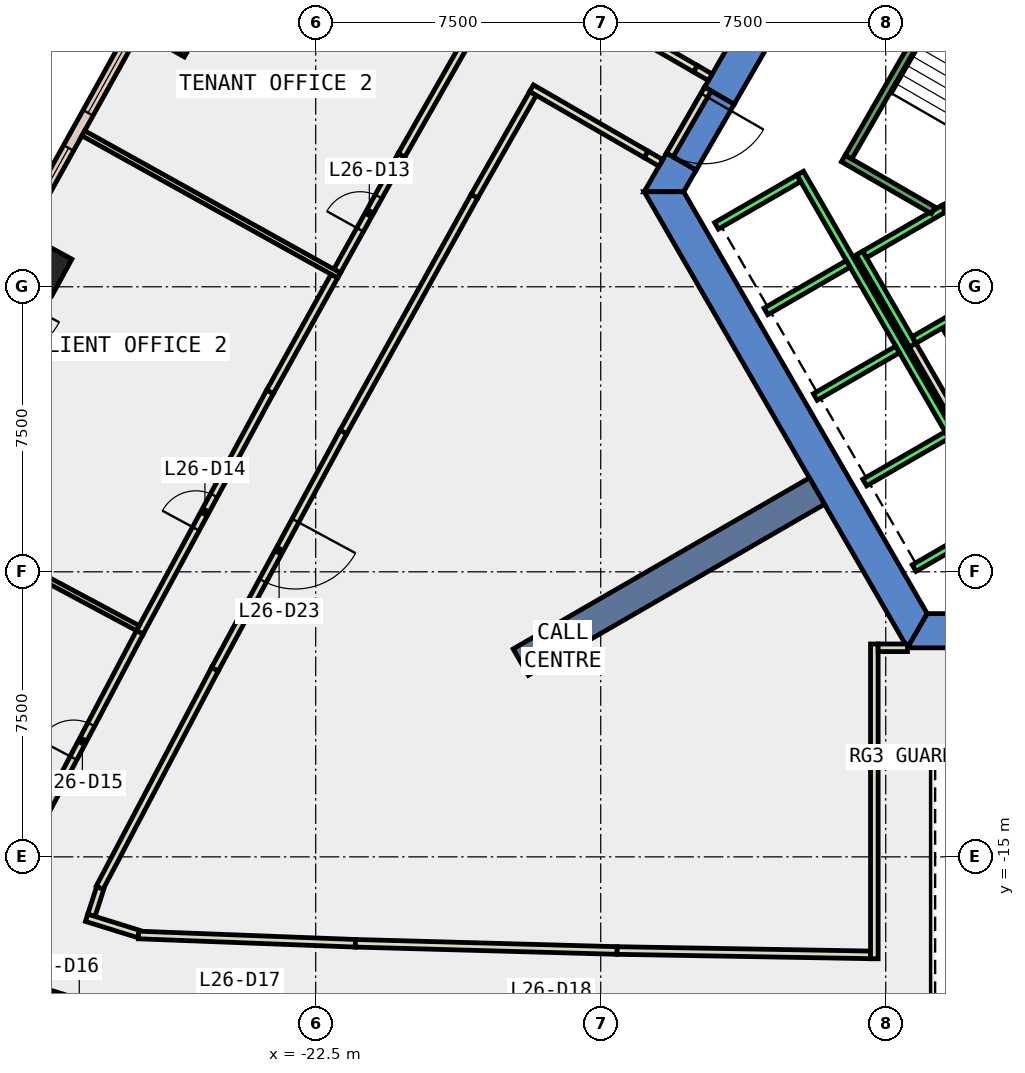
"""IFC4 building model, lengths in metres.
Left out: names, types, materials, properties, quantities, classifications, styles, units other than length and angle.
Written with IfcOpenShell. Run it as: python <this file> out.ifc"""

import sys

from ifc_helpers import new_model, si_unit, direction, frame, frame_2d, origin, origin_2d, place, context, subcontext, project, spatial, polyline, rectangle, outline, extrude, element, fill, save


model = new_model("IFC4")
c1 = context("Model", 3, precision=1e-05, world=origin(), true_north=direction((0.0, 1.0)))
c2 = subcontext(c1, "Body", "Model", "MODEL_VIEW")
j1 = project(units=[si_unit("LENGTHUNIT", "METRE"), si_unit("PLANEANGLEUNIT", "RADIAN")], contexts=[c1])
p1 = place(None, origin())
s1 = spatial("IfcSite", under=j1, at=p1, CompositionType="ELEMENT")
p2 = place(p1, origin())
s2 = spatial("IfcBuilding", under=s1, at=p2, CompositionType="ELEMENT")
p3 = place(p2, frame((0.0, 0.0, 120.2)))
s3 = spatial("IfcBuildingStorey", under=s2, at=p3, CompositionType="ELEMENT", Elevation=120.2)
for number, where, z_axis, x_axis in (
    (1, (-26.341, 6.896, -0.4), (0.0, 0.0, 1.0), (0.49, 0.872, 0.0)),
    (2, (-29.838, 0.604, -0.4), (0.0, 0.0, 1.0), (0.48, 0.877, 0.0)),
):
    element("IfcColumn", number, at=place(p3, frame(where, z_axis=z_axis, x_axis=x_axis)), inside=s3, PredefinedType="COLUMN", context=c2, shape_type="SweptSolid", body=[
        extrude(rectangle(XDim=1.1, YDim=1.5, at=origin_2d()), origin(), (0.0, 0.0, 1.0), 4.2),
    ])
p4 = place(p3, frame((0.0, 0.0, -0.4)))
e3 = element("IfcWall", 3, at=p4, inside=s3, PredefinedType="SHEAR", context=c2, shape_type="SweptSolid", body=[
    extrude(outline(polyline([(-12.267, 5.252), (-11.488, 4.802), (-6.409, 13.6), (-6.928, 14.5), (-12.267, 5.252)])), origin(), (0.0, 0.0, 1.0), 4.2),
])
p5 = place(p3, frame((0.0, 0.0, -0.4)))
e4 = element("IfcWall", 4, at=p5, inside=s3, PredefinedType="SHEAR", context=c2, shape_type="SweptSolid", body=[
    extrude(outline(polyline([(-12.488, 3.07), (-13.267, 3.52), (-13.856, 2.5), (-12.817, 2.5), (-12.488, 3.07)])), origin(), (0.0, 0.0, 1.0), 4.2),
])
p6 = place(p3, frame((0.0, 0.0, 3.6)))
e5 = element("IfcWall", 5, at=p6, inside=s3, PredefinedType="SHEAR", context=c2, shape_type="SweptSolid", body=[
    extrude(outline(polyline([(-13.267, 3.52), (-12.488, 3.07), (-11.488, 4.802), (-12.267, 5.252), (-13.267, 3.52)])), origin(), (0.0, 0.0, 1.0), 0.2),
])
p7 = place(p3, frame((0.0, 0.0, -0.4)))
e6 = element("IfcWall", 6, at=p7, inside=s3, PredefinedType="SHEAR", context=c2, shape_type="SweptSolid", body=[
    extrude(outline(polyline([(-13.856, 2.5), (-6.928, -9.5), (-6.409, -8.6), (-12.817, 2.5), (-13.856, 2.5)])), origin(), (0.0, 0.0, 1.0), 4.2),
])
p8 = place(p3, frame((0.0, 0.0, -0.4)))
e7 = element("IfcWall", 7, at=p8, inside=s3, PredefinedType="SHEAR", context=c2, shape_type="SweptSolid", body=[
    extrude(outline(polyline([(3.75, -9.5), (3.75, -8.6), (-6.409, -8.6), (-6.928, -9.5), (3.75, -9.5)])), origin(), (0.0, 0.0, 1.0), 4.2),
])
p9 = place(p3, frame((-9.31, -5.375, -0.4), z_axis=(0.0, 0.0, 1.0), x_axis=(-0.866017533419, -0.500013631625, 0.0)))
e8 = element("IfcWall", 8, at=p9, inside=s3, PredefinedType="SHEAR", context=c2, shape_type="SweptSolid", body=[
    extrude(rectangle(XDim=9.0, YDim=0.8, at=frame_2d((4.5, 0.0))), origin(), (0.0, 0.0, 1.0), 4.2),
])
p10 = place(p3, frame((-27.262, 6.784, 0.0), z_axis=(0.0, 0.0, 1.0), x_axis=(-0.485822751649, -0.874057351654, 0.0)))
e9 = element("IfcWall", 9, at=p10, inside=s3, PredefinedType="STANDARD", context=c2, shape_type="SweptSolid", body=[
    extrude(rectangle(XDim=6.109, YDim=0.3, at=frame_2d((3.055, 0.0))), origin(), (0.0, 0.0, 1.0), 3.8),
])
p11 = place(p10, frame((0.527, 0.0, 0.9)))
e10 = element("IfcOpeningElement", 10, at=p11, cuts=e9, PredefinedType="OPENING", context=c2, shape_type="SweptSolid", body=[
    extrude(rectangle(XDim=2.0, YDim=2.6, at=frame_2d((1.0, 1.3))), frame((0.0, 0.16, 0.0), z_axis=(0.0, -1.0, 0.0), x_axis=(1.0, 0.0, 0.0)), (0.0, 0.0, 1.0), 0.32),
])
p12 = place(p10, frame((3.582, 0.0, 0.9)))
e11 = element("IfcOpeningElement", 11, at=p12, cuts=e9, PredefinedType="OPENING", context=c2, shape_type="SweptSolid", body=[
    extrude(rectangle(XDim=2.0, YDim=2.6, at=frame_2d((1.0, 1.3))), frame((0.0, 0.16, 0.0), z_axis=(0.0, -1.0, 0.0), x_axis=(1.0, 0.0, 0.0)), (0.0, 0.0, 1.0), 0.32),
])
p13 = place(p3, frame((-15.532, 7.484, 0.0), z_axis=(0.0, 0.0, 1.0), x_axis=(0.866045954906, -0.499964402723, 0.0)))
e12 = element("IfcWall", 12, at=p13, inside=s3, PredefinedType="PARTITIONING", context=c2, shape_type="SweptSolid", body=[
    extrude(rectangle(XDim=3.494, YDim=0.2, at=frame_2d((1.747, 0.0))), origin(), (0.0, 0.0, 1.0), 3.8),
])
p14 = place(p3, frame((-13.417, 3.26, 0.0), z_axis=(0.0, 0.0, 1.0), x_axis=(-0.866032067792, 0.499988457423, 0.0)))
e13 = element("IfcWall", 13, at=p14, inside=s3, PredefinedType="PARTITIONING", context=c2, shape_type="SweptSolid", body=[
    extrude(rectangle(XDim=0.45, YDim=0.2, at=frame_2d((0.225, 0.0))), origin(), (0.0, 0.0, 1.0), 2.4),
])
p15 = place(p3, frame((-16.783, 5.088, 0.0), z_axis=(0.0, 0.0, 1.0), x_axis=(-0.495023676383, -0.868879485211, 0.0)))
e14 = element("IfcWall", 14, at=p15, inside=s3, PredefinedType="PARTITIONING", context=c2, shape_type="SweptSolid", body=[
    extrude(rectangle(XDim=3.113, YDim=0.2, at=frame_2d((1.557, 0.0))), origin(), (0.0, 0.0, 1.0), 3.8),
])
p16 = place(p3, frame((-18.324, 2.383, 0.0), z_axis=(0.0, 0.0, 1.0), x_axis=(-0.485826874234, -0.874055060206, 0.0)))
e15 = element("IfcWall", 15, at=p16, inside=s3, PredefinedType="PARTITIONING", context=c2, shape_type="SweptSolid", body=[
    extrude(rectangle(XDim=7.099, YDim=0.2, at=frame_2d((3.55, 0.0))), origin(), (0.0, 0.0, 1.0), 3.8),
])
p17 = place(p3, frame((-21.773, -3.822, 0.0), z_axis=(0.0, 0.0, 1.0), x_axis=(-0.476124717613, -0.87937776483, 0.0)))
e16 = element("IfcWall", 16, at=p17, inside=s3, PredefinedType="PARTITIONING", context=c2, shape_type="SweptSolid", body=[
    extrude(rectangle(XDim=7.099, YDim=0.2, at=frame_2d((3.55, 0.0))), origin(), (0.0, 0.0, 1.0), 3.8),
])
p18 = place(p17, frame((2.65, 0.0, 0.0)))
e17 = element("IfcOpeningElement", 17, at=p18, cuts=e16, PredefinedType="OPENING", context=c2, shape_type="SweptSolid", body=[
    extrude(rectangle(XDim=1.8, YDim=2.1, at=frame_2d((0.9, 1.05))), frame((0.0, 0.11, 0.0), z_axis=(0.0, -1.0, 0.0), x_axis=(1.0, 0.0, 0.0)), (0.0, 0.0, 1.0), 0.22),
])
p19 = place(p3, frame((-25.153, -10.065, 0.0), z_axis=(0.0, 0.0, 1.0), x_axis=(-0.466663976618, -0.884434696813, 0.0)))
e18 = element("IfcWall", 18, at=p19, inside=s3, PredefinedType="PARTITIONING", context=c2, shape_type="SweptSolid", body=[
    extrude(rectangle(XDim=6.501, YDim=0.2, at=frame_2d((3.25, 0.0))), origin(), (0.0, 0.0, 1.0), 3.8),
])
p20 = place(p3, frame((-28.171, -15.821, 0.0), z_axis=(0.0, 0.0, 1.0), x_axis=(-0.308053137273, -0.951369152651, 0.0)))
e19 = element("IfcWall", 19, at=p20, inside=s3, PredefinedType="PARTITIONING", context=c2, shape_type="SweptSolid", body=[
    extrude(rectangle(XDim=0.754, YDim=0.2, at=frame_2d((0.377, 0.0))), origin(), (0.0, 0.0, 1.0), 3.8),
])
p21 = place(p3, frame((-28.529, -16.603, 0.0), z_axis=(0.0, 0.0, 1.0), x_axis=(0.954829998701, -0.297152609916, 0.0)))
e20 = element("IfcWall", 20, at=p21, inside=s3, PredefinedType="PARTITIONING", context=c2, shape_type="SweptSolid", body=[
    extrude(rectangle(XDim=1.437, YDim=0.2, at=frame_2d((0.719, 0.0))), origin(), (0.0, 0.0, 1.0), 3.8),
])
p22 = place(p3, frame((-27.162, -17.056, 0.0), z_axis=(0.0, 0.0, 1.0), x_axis=(0.999270868304, -0.038180253525, 0.0)))
e21 = element("IfcWall", 21, at=p22, inside=s3, PredefinedType="PARTITIONING", context=c2, shape_type="SweptSolid", body=[
    extrude(rectangle(XDim=5.71, YDim=0.2, at=frame_2d((2.855, 0.0))), origin(), (0.0, 0.0, 1.0), 3.8),
])
p23 = place(p3, frame((-21.456, -17.274, 0.0), z_axis=(0.0, 0.0, 1.0), x_axis=(0.999618915549, -0.02760477632, 0.0)))
e22 = element("IfcWall", 22, at=p23, inside=s3, PredefinedType="PARTITIONING", context=c2, shape_type="SweptSolid", body=[
    extrude(rectangle(XDim=6.89, YDim=0.2, at=frame_2d((3.445, 0.0))), origin(), (0.0, 0.0, 1.0), 3.8),
])
p24 = place(p3, frame((-14.569, -17.464, 0.0), z_axis=(0.0, 0.0, 1.0), x_axis=(0.999851389672, -0.017239448129, 0.0)))
e23 = element("IfcWall", 23, at=p24, inside=s3, PredefinedType="PARTITIONING", context=c2, shape_type="SweptSolid", body=[
    extrude(rectangle(XDim=6.67, YDim=0.2, at=frame_2d((3.335, 0.0))), origin(), (0.0, 0.0, 1.0), 3.8),
])
p25 = place(p3, frame((-21.936, 0.414, 0.0), z_axis=(0.0, 0.0, 1.0), x_axis=(0.485827202541, 0.874054877723, 0.0)))
e24 = element("IfcWall", 24, at=p25, inside=s3, PredefinedType="PARTITIONING", context=c2, shape_type="SweptSolid", body=[
    extrude(rectangle(XDim=3.487, YDim=0.2, at=frame_2d((1.744, 0.0))), origin(), (0.0, 0.0, 1.0), 3.8),
])
p26 = place(p25, frame((1.244, 0.0, 0.0)))
e25 = element("IfcOpeningElement", 25, at=p26, cuts=e24, PredefinedType="OPENING", context=c2, shape_type="SweptSolid", body=[
    extrude(rectangle(XDim=1.0, YDim=2.1, at=frame_2d((0.5, 1.05))), frame((0.0, 0.11, 0.0), z_axis=(0.0, -1.0, 0.0), x_axis=(1.0, 0.0, 0.0)), (0.0, 0.0, 1.0), 0.22),
])
p27 = place(p3, frame((-20.242, 3.462, 0.0), z_axis=(0.0, 0.0, 1.0), x_axis=(0.495309264725, 0.868716715781, 0.0)))
e26 = element("IfcWall", 26, at=p27, inside=s3, PredefinedType="PARTITIONING", context=c2, shape_type="SweptSolid", body=[
    extrude(rectangle(XDim=3.487, YDim=0.2, at=frame_2d((1.743, 0.0))), origin(), (0.0, 0.0, 1.0), 3.8),
])
p28 = place(p3, frame((-27.129, -9.094, 0.0), z_axis=(0.0, 0.0, 1.0), x_axis=(0.476090835435, 0.879396108938, 0.0)))
e27 = element("IfcWall", 27, at=p28, inside=s3, PredefinedType="PARTITIONING", context=c2, shape_type="SweptSolid", body=[
    extrude(rectangle(XDim=7.198, YDim=0.2, at=frame_2d((3.599, 0.0))), origin(), (0.0, 0.0, 1.0), 3.8),
])
p29 = place(p28, frame((3.099, 0.0, 0.0)))
e28 = element("IfcOpeningElement", 28, at=p29, cuts=e27, PredefinedType="OPENING", context=c2, shape_type="SweptSolid", body=[
    extrude(rectangle(XDim=1.0, YDim=2.1, at=frame_2d((0.5, 1.05))), frame((0.0, 0.11, 0.0), z_axis=(0.0, -1.0, 0.0), x_axis=(1.0, 0.0, 0.0)), (0.0, 0.0, 1.0), 0.22),
])
p30 = place(p3, frame((-23.702, -2.764, 0.0), z_axis=(0.0, 0.0, 1.0), x_axis=(0.485892653581, 0.874018494767, 0.0)))
e29 = element("IfcWall", 29, at=p30, inside=s3, PredefinedType="PARTITIONING", context=c2, shape_type="SweptSolid", body=[
    extrude(rectangle(XDim=3.486, YDim=0.2, at=frame_2d((1.743, 0.0))), origin(), (0.0, 0.0, 1.0), 3.8),
])
p31 = place(p3, frame((-30.221, -14.956, 0.0), z_axis=(0.0, 0.0, 1.0), x_axis=(0.466543318111, 0.884498350663, 0.0)))
e30 = element("IfcWall", 30, at=p31, inside=s3, PredefinedType="PARTITIONING", context=c2, shape_type="SweptSolid", body=[
    extrude(rectangle(XDim=6.627, YDim=0.2, at=frame_2d((3.314, 0.0))), origin(), (0.0, 0.0, 1.0), 3.8),
])
p32 = place(p31, frame((2.889, 0.0, 0.0)))
e31 = element("IfcOpeningElement", 31, at=p32, cuts=e30, PredefinedType="OPENING", context=c2, shape_type="SweptSolid", body=[
    extrude(rectangle(XDim=1.0, YDim=2.1, at=frame_2d((0.5, 1.05))), frame((0.0, 0.11, 0.0), z_axis=(0.0, -1.0, 0.0), x_axis=(1.0, 0.0, 0.0)), (0.0, 0.0, 1.0), 0.22),
])
p33 = place(p3, frame((-27.533, -19.217, 0.0), z_axis=(0.0, 0.0, 1.0), x_axis=(-0.954946345159, 0.296778499671, 0.0)))
e32 = element("IfcWall", 32, at=p33, inside=s3, PredefinedType="PARTITIONING", context=c2, shape_type="SweptSolid", body=[
    extrude(rectangle(XDim=2.49, YDim=0.2, at=frame_2d((1.245, 0.0))), origin(), (0.0, 0.0, 1.0), 3.8),
])
p34 = place(p33, frame((0.745, 0.0, 0.0)))
e33 = element("IfcOpeningElement", 33, at=p34, cuts=e32, PredefinedType="OPENING", context=c2, shape_type="SweptSolid", body=[
    extrude(rectangle(XDim=1.0, YDim=2.1, at=frame_2d((0.5, 1.05))), frame((0.0, 0.11, 0.0), z_axis=(0.0, -1.0, 0.0), x_axis=(1.0, 0.0, 0.0)), (0.0, 0.0, 1.0), 0.22),
])
p35 = place(p3, frame((-5.126, -2.422, 0.0), z_axis=(0.0, 0.0, 1.0), x_axis=(-0.500062241894, 0.865989465428, 0.0)))
e34 = element("IfcWall", 34, at=p35, inside=s3, PredefinedType="PARTITIONING", context=c2, shape_type="SweptSolid", body=[
    extrude(rectangle(XDim=1.7, YDim=0.2, at=frame_2d((0.85, 0.0))), origin(), (0.0, 0.0, 1.0), 3.8),
])
p36 = place(p3, frame((-5.492, -3.788, 0.0), z_axis=(0.0, 0.0, 1.0), x_axis=(-0.500008949224, 0.866020236886, 0.0)))
e35 = element("IfcWall", 35, at=p36, inside=s3, PredefinedType="PARTITIONING", context=c2, shape_type="SweptSolid", body=[
    extrude(rectangle(XDim=2.68, YDim=0.2, at=frame_2d((1.34, 0.0))), origin(), (0.0, 0.0, 1.0), 3.8),
])
p37 = place(p3, frame((-7.8, -17.681, 0.0), z_axis=(0.0, 0.0, 1.0), x_axis=(0.0, 1.0, 0.0)))
e36 = element("IfcWall", 36, at=p37, inside=s3, PredefinedType="PARTITIONING", context=c2, shape_type="SweptSolid", body=[
    extrude(rectangle(XDim=8.282, YDim=0.2, at=frame_2d((4.141, 0.0))), origin(), (0.0, 0.0, 1.0), 3.8),
])
p38 = place(p3, frame((-7.7, -9.499, 0.0), z_axis=(0.0, 0.0, 1.0), x_axis=(1.0, 0.0, 0.0)))
e37 = element("IfcWall", 37, at=p38, inside=s3, PredefinedType="PARTITIONING", context=c2, shape_type="SweptSolid", body=[
    extrude(rectangle(XDim=0.771, YDim=0.2, at=frame_2d((0.385, 0.0))), origin(), (0.0, 0.0, 1.0), 3.8),
])
p39 = place(p3, frame((-21.885, 0.3, 0.0), z_axis=(0.0, 0.0, 1.0), x_axis=(-0.874095944746, 0.485753311237, 0.0)))
e38 = element("IfcWall", 38, at=p39, inside=s3, PredefinedType="PARTITIONING", context=c2, shape_type="SweptSolid", body=[
    extrude(rectangle(XDim=7.699, YDim=0.15, at=frame_2d((3.85, 0.0))), origin(), (0.0, 0.0, 1.0), 3.8),
])
p40 = place(p3, frame((-27.182, -8.981, 0.0), z_axis=(0.0, 0.0, 1.0), x_axis=(-0.881899408669, 0.471437623647, 0.0)))
e39 = element("IfcWall", 39, at=p40, inside=s3, PredefinedType="PARTITIONING", context=c2, shape_type="SweptSolid", body=[
    extrude(rectangle(XDim=6.13, YDim=0.15, at=frame_2d((3.065, 0.0))), origin(), (0.0, 0.0, 1.0), 3.8),
])
p41 = place(p3, frame((-12.18, 5.202, 0.0), z_axis=(0.0, 0.0, 1.0), x_axis=(-0.50002537861, -0.866010750942, 0.0)))
e40 = element("IfcWall", 40, at=p41, inside=s3, PredefinedType="PARTITIONING", context=c2, shape_type="SweptSolid", body=[
    extrude(rectangle(XDim=2.0, YDim=0.2, at=frame_2d((1.0, 0.0))), origin(), (0.0, 0.0, 1.0), 2.4),
])
p42 = place(p41, frame((0.19, 0.0, 0.0)))
e41 = element("IfcOpeningElement", 41, at=p42, cuts=e40, PredefinedType="OPENING", context=c2, shape_type="SweptSolid", body=[
    extrude(rectangle(XDim=1.8, YDim=2.1, at=frame_2d((0.9, 1.05))), frame((0.0, 0.11, 0.0), z_axis=(0.0, -1.0, 0.0), x_axis=(1.0, 0.0, 0.0)), (0.0, 0.0, 1.0), 0.22),
])
p43 = place(p3, frame((-12.506, 5.737, 0.0), z_axis=(0.0, 0.0, 1.0), x_axis=(0.865624510465, -0.500693725627, 0.0)))
e42 = element("IfcWall", 42, at=p43, inside=s3, PredefinedType="PARTITIONING", context=c2, shape_type="SweptSolid", body=[
    extrude(rectangle(XDim=0.449, YDim=0.2, at=frame_2d((0.225, 0.0))), origin(), (0.0, 0.0, 1.0), 2.4),
])
p44 = place(p3, frame((-13.807, 3.485, 0.0), z_axis=(0.0, 0.0, 1.0), x_axis=(-0.865984597717, 0.500070671522, 0.0)))
e43 = element("IfcWall", 43, at=p44, inside=s3, PredefinedType="PARTITIONING", context=c2, shape_type="SweptSolid", body=[
    extrude(rectangle(XDim=3.479, YDim=0.2, at=frame_2d((1.74, 0.0))), origin(), (0.0, 0.0, 1.0), 3.8),
])
p45 = place(p3, frame((-5.94, 2.188, 0.0), z_axis=(0.0, 0.0, 1.0), x_axis=(0.49994636267, -0.866056369097, 0.0)))
e44 = element("IfcWall", 44, at=p45, inside=s3, PredefinedType="STANDARD", context=c2, shape_type="SweptSolid", body=[
    extrude(rectangle(XDim=2.8, YDim=0.2, at=frame_2d((1.4, 0.0))), origin(), (0.0, 0.0, 1.0), 3.8),
])
p46 = place(p45, frame((1.225, 0.0, 0.0)))
e45 = element("IfcOpeningElement", 45, at=p46, cuts=e44, PredefinedType="OPENING", context=c2, shape_type="SweptSolid", body=[
    extrude(rectangle(XDim=1.1, YDim=2.1, at=frame_2d((0.55, 1.05))), frame((0.0, 0.11, 0.0), z_axis=(0.0, -1.0, 0.0), x_axis=(1.0, 0.0, 0.0)), (0.0, 0.0, 1.0), 0.22),
])
p47 = place(p3, frame((-8.192, 0.888, 0.0), z_axis=(0.0, 0.0, 1.0), x_axis=(0.49994636267, -0.866056369097, 0.0)))
e46 = element("IfcWall", 46, at=p47, inside=s3, PredefinedType="STANDARD", context=c2, shape_type="SweptSolid", body=[
    extrude(rectangle(XDim=2.8, YDim=0.2, at=frame_2d((1.4, 0.0))), origin(), (0.0, 0.0, 1.0), 3.8),
])
for number, where, z_axis, x_axis in (
    (47, (-5.977, 2.052, 0.0), (0.0, 0.0, 1.0), (-0.866, -0.5, 0.0)),
    (48, (-4.677, -0.2, 0.0), (0.0, 0.0, 1.0), (-0.866, -0.5, 0.0)),
):
    element("IfcWall", number, at=place(p3, frame(where, z_axis=z_axis, x_axis=x_axis)), inside=s3, PredefinedType="STANDARD", context=c2, shape_type="SweptSolid", body=[
        extrude(rectangle(XDim=2.399, YDim=0.2, at=frame_2d((1.2, 0.0))), origin(), (0.0, 0.0, 1.0), 3.8),
    ])
p48 = place(p3, frame((-9.751, 2.99, 0.0), z_axis=(0.0, 0.0, 1.0), x_axis=(0.50000090737, -0.866024879913, 0.0)))
e49 = element("IfcWall", 49, at=p48, inside=s3, PredefinedType="STANDARD", context=c2, shape_type="SweptSolid", body=[
    extrude(rectangle(XDim=10.6, YDim=0.2, at=frame_2d((5.3, 0.0))), origin(), (0.0, 0.0, 1.0), 3.8),
])
p49 = place(p3, frame((-9.788, 2.853, 0.0), z_axis=(0.0, 0.0, 1.0), x_axis=(-0.865998541277, -0.500046524342, 0.0)))
e50 = element("IfcWall", 50, at=p49, inside=s3, PredefinedType="STANDARD", context=c2, shape_type="SweptSolid", body=[
    extrude(rectangle(XDim=2.5, YDim=0.2, at=frame_2d((1.25, 0.0))), origin(), (0.0, 0.0, 1.0), 3.8),
])
for number, where, z_axis, x_axis in (
    (51, (-8.488, 0.602, 0.0), (0.0, 0.0, 1.0), (-0.866, -0.5, 0.0)),
    (52, (-7.188, -1.65, 0.0), (0.0, 0.0, 1.0), (-0.866, -0.5, 0.0)),
    (53, (-5.888, -3.902, 0.0), (0.0, 0.0, 1.0), (-0.866, -0.5, 0.0)),
    (54, (-4.588, -6.153, 0.0), (0.0, 0.0, 1.0), (-0.866, -0.5, 0.0)),
):
    element("IfcWall", number, at=place(p3, frame(where, z_axis=z_axis, x_axis=x_axis)), inside=s3, PredefinedType="STANDARD", context=c2, shape_type="SweptSolid", body=[
        extrude(rectangle(XDim=2.5, YDim=0.2, at=frame_2d((1.25, 0.0))), origin(), (0.0, 0.0, 1.0), 3.8),
    ])
p50 = place(p3, frame((-6.25, 2.01, 0.0), z_axis=(0.0, 0.0, 1.0), x_axis=(-0.86611865017, 0.499838457731, 0.0)))
e55 = element("IfcWall", 55, at=p50, inside=s3, PredefinedType="STANDARD", context=c2, shape_type="SweptSolid", body=[
    extrude(rectangle(XDim=2.733, YDim=0.2, at=frame_2d((1.366, 0.0))), origin(), (0.0, 0.0, 1.0), 3.8),
])
p51 = place(p3, frame((-5.03, 9.388, 0.0), z_axis=(0.0, 0.0, 1.0), x_axis=(-0.499978703459, -0.866037698999, 0.0)))
e56 = element("IfcWall", 56, at=p51, inside=s3, PredefinedType="STANDARD", context=c2, shape_type="SweptSolid", body=[
    extrude(rectangle(XDim=6.9, YDim=0.2, at=frame_2d((3.45, 0.0))), origin(), (0.0, 0.0, 1.0), 3.8),
])
p52 = place(p11, origin())
e57 = element("IfcWindow", 57, at=p52, inside=s3, PartitioningType="SINGLE_PANEL", PredefinedType="WINDOW", context=c2, shape_type="SweptSolid", body=[
    extrude(rectangle(XDim=2.0, YDim=2.6, at=frame_2d((1.0, 1.3))), frame((0.0, 0.03, 0.0), z_axis=(0.0, -1.0, 0.0), x_axis=(1.0, 0.0, 0.0)), (0.0, 0.0, 1.0), 0.06),
])
fill(e10, e57)
p53 = place(p12, origin())
e58 = element("IfcWindow", 58, at=p53, inside=s3, PartitioningType="SINGLE_PANEL", PredefinedType="WINDOW", context=c2, shape_type="SweptSolid", body=[
    extrude(rectangle(XDim=2.0, YDim=2.6, at=frame_2d((1.0, 1.3))), frame((0.0, 0.03, 0.0), z_axis=(0.0, -1.0, 0.0), x_axis=(1.0, 0.0, 0.0)), (0.0, 0.0, 1.0), 0.06),
])
fill(e11, e58)
p54 = place(p26, origin())
e59 = element("IfcDoor", 59, at=p54, inside=s3, OperationType="SINGLE_SWING_RIGHT", PredefinedType="DOOR", context=c2, shape_type="SweptSolid", body=[
    extrude(rectangle(XDim=1.0, YDim=2.1, at=frame_2d((0.5, 1.05))), frame((0.0, 0.025, 0.0), z_axis=(0.0, -1.0, 0.0), x_axis=(1.0, 0.0, 0.0)), (0.0, 0.0, 1.0), 0.05),
])
fill(e25, e59)
p55 = place(p29, origin())
e60 = element("IfcDoor", 60, at=p55, inside=s3, OperationType="SINGLE_SWING_RIGHT", PredefinedType="DOOR", context=c2, shape_type="SweptSolid", body=[
    extrude(rectangle(XDim=1.0, YDim=2.1, at=frame_2d((0.5, 1.05))), frame((0.0, 0.025, 0.0), z_axis=(0.0, -1.0, 0.0), x_axis=(1.0, 0.0, 0.0)), (0.0, 0.0, 1.0), 0.05),
])
fill(e28, e60)
p56 = place(p32, origin())
e61 = element("IfcDoor", 61, at=p56, inside=s3, OperationType="SINGLE_SWING_LEFT", PredefinedType="DOOR", context=c2, shape_type="SweptSolid", body=[
    extrude(rectangle(XDim=1.0, YDim=2.1, at=frame_2d((0.5, 1.05))), frame((0.0, 0.025, 0.0), z_axis=(0.0, -1.0, 0.0), x_axis=(1.0, 0.0, 0.0)), (0.0, 0.0, 1.0), 0.05),
])
fill(e31, e61)
p57 = place(p18, origin())
e62 = element("IfcDoor", 62, at=p57, inside=s3, OperationType="DOUBLE_DOOR_SINGLE_SWING", PredefinedType="DOOR", context=c2, shape_type="SweptSolid", body=[
    extrude(rectangle(XDim=1.8, YDim=2.1, at=frame_2d((0.9, 1.05))), frame((0.0, 0.025, 0.0), z_axis=(0.0, -1.0, 0.0), x_axis=(1.0, 0.0, 0.0)), (0.0, 0.0, 1.0), 0.05),
])
fill(e17, e62)
p58 = place(p42, origin())
e63 = element("IfcDoor", 63, at=p58, inside=s3, OperationType="DOUBLE_DOOR_SINGLE_SWING", PredefinedType="DOOR", context=c2, shape_type="SweptSolid", body=[
    extrude(rectangle(XDim=1.8, YDim=2.1, at=frame_2d((0.9, 1.05))), frame((0.0, 0.025, 0.0), z_axis=(0.0, -1.0, 0.0), x_axis=(1.0, 0.0, 0.0)), (0.0, 0.0, 1.0), 0.05),
])
fill(e41, e63)
save(model, sys.argv[1])
